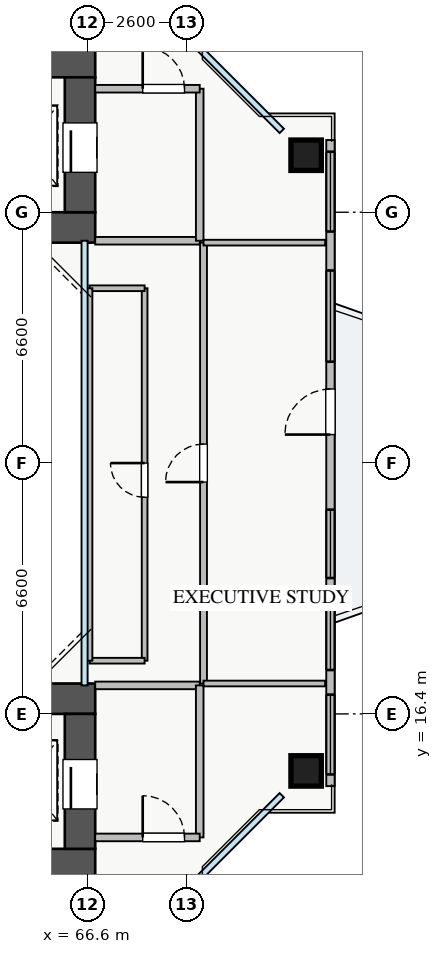
"""IFC4 building model, lengths in metres.
Left out: names, types, materials, properties, quantities, classifications, styles, units other than length and angle.
Written with IfcOpenShell. Run it as: python <this file> out.ifc"""

import sys

from ifc_helpers import new_model, si_unit, direction, frame, frame_2d, origin, origin_2d, place, context, subcontext, project, spatial, rectangle, extrude, source, transform, mapped, element, fill, save


model = new_model("IFC4")
c1 = context("Model", 3, precision=1e-05, world=origin(), true_north=direction((0.0, 1.0)))
c2 = subcontext(c1, "Body", "Model", "MODEL_VIEW")
j1 = project(units=[si_unit("LENGTHUNIT", "METRE"), si_unit("PLANEANGLEUNIT", "RADIAN")], contexts=[c1])
p1 = place(None, origin())
s1 = spatial("IfcSite", under=j1, at=p1, CompositionType="ELEMENT")
p2 = place(p1, origin())
s2 = spatial("IfcBuilding", under=s1, at=p2, CompositionType="ELEMENT")
p3 = place(p2, frame((0.0, 0.0, 100.25)))
s3 = spatial("IfcBuildingStorey", under=s2, at=p3, CompositionType="ELEMENT", Elevation=100.25)
p4 = place(p3, frame((54.2, 29.2, 0.0), z_axis=(0.0, 0.0, 1.0), x_axis=(1.0, 0.0, 0.0)))
e1 = element("IfcWall", 1, at=p4, inside=s3, PredefinedType="SHEAR", context=c2, shape_type="SweptSolid", body=[
    extrude(rectangle(XDim=12.6, YDim=0.8, at=frame_2d((6.3, 0.0))), origin(), (0.0, 0.0, 1.0), 3.25),
])
p5 = place(p3, frame((54.2, 33.55, 0.0), z_axis=(0.0, 0.0, 1.0), x_axis=(1.0, 0.0, 0.0)))
e2 = element("IfcWall", 2, at=p5, inside=s3, PredefinedType="SHEAR", context=c2, shape_type="SweptSolid", body=[
    extrude(rectangle(XDim=12.6, YDim=0.8, at=frame_2d((6.3, 0.0))), origin(), (0.0, 0.0, 1.0), 3.25),
])
p6 = place(p5, frame((8.2, 0.0, 0.0)))
e3 = element("IfcOpeningElement", 3, at=p6, cuts=e2, PredefinedType="OPENING", context=c2, shape_type="SweptSolid", body=[
    extrude(rectangle(XDim=1.1, YDim=2.05, at=frame_2d((0.55, 1.025))), frame((0.0, 0.41, 0.0), z_axis=(0.0, -1.0, 0.0), x_axis=(1.0, 0.0, 0.0)), (0.0, 0.0, 1.0), 0.82),
])
p7 = place(p3, frame((66.4, 29.6, 0.0), z_axis=(0.0, 0.0, 1.0), x_axis=(0.0, 1.0, 0.0)))
e4 = element("IfcWall", 4, at=p7, inside=s3, PredefinedType="SHEAR", context=c2, shape_type="SweptSolid", body=[
    extrude(rectangle(XDim=3.55, YDim=0.8, at=frame_2d((1.775, 0.0))), origin(), (0.0, 0.0, 1.0), 3.25),
])
p8 = place(p7, frame((1.05, 0.0, 0.0)))
e5 = element("IfcOpeningElement", 5, at=p8, cuts=e4, PredefinedType="OPENING", context=c2, shape_type="SweptSolid", body=[
    extrude(rectangle(XDim=1.3, YDim=2.05, at=frame_2d((0.65, 1.025))), frame((0.0, 0.41, 0.0), z_axis=(0.0, -1.0, 0.0), x_axis=(1.0, 0.0, 0.0)), (0.0, 0.0, 1.0), 0.82),
])
p9 = place(p3, frame((54.2, 12.45, 0.0), z_axis=(0.0, 0.0, 1.0), x_axis=(1.0, 0.0, 0.0)))
e6 = element("IfcWall", 6, at=p9, inside=s3, PredefinedType="SHEAR", context=c2, shape_type="SweptSolid", body=[
    extrude(rectangle(XDim=12.6, YDim=0.8, at=frame_2d((6.3, 0.0))), origin(), (0.0, 0.0, 1.0), 3.25),
])
p10 = place(p9, frame((8.2, 0.0, 0.0)))
e7 = element("IfcOpeningElement", 7, at=p10, cuts=e6, PredefinedType="OPENING", context=c2, shape_type="SweptSolid", body=[
    extrude(rectangle(XDim=1.1, YDim=2.05, at=frame_2d((0.55, 1.025))), frame((0.0, 0.41, 0.0), z_axis=(0.0, -1.0, 0.0), x_axis=(1.0, 0.0, 0.0)), (0.0, 0.0, 1.0), 0.82),
])
p11 = place(p3, frame((54.2, 16.8, 0.0), z_axis=(0.0, 0.0, 1.0), x_axis=(1.0, 0.0, 0.0)))
e8 = element("IfcWall", 8, at=p11, inside=s3, PredefinedType="SHEAR", context=c2, shape_type="SweptSolid", body=[
    extrude(rectangle(XDim=12.6, YDim=0.8, at=frame_2d((6.3, 0.0))), origin(), (0.0, 0.0, 1.0), 3.25),
])
p12 = place(p3, frame((66.4, 12.85, 0.0), z_axis=(0.0, 0.0, 1.0), x_axis=(0.0, 1.0, 0.0)))
e9 = element("IfcWall", 9, at=p12, inside=s3, PredefinedType="SHEAR", context=c2, shape_type="SweptSolid", body=[
    extrude(rectangle(XDim=3.55, YDim=0.8, at=frame_2d((1.775, 0.0))), origin(), (0.0, 0.0, 1.0), 3.25),
])
p13 = place(p12, frame((1.05, 0.0, 0.0)))
e10 = element("IfcOpeningElement", 10, at=p13, cuts=e9, PredefinedType="OPENING", context=c2, shape_type="SweptSolid", body=[
    extrude(rectangle(XDim=1.3, YDim=2.05, at=frame_2d((0.65, 1.025))), frame((0.0, 0.41, 0.0), z_axis=(0.0, -1.0, 0.0), x_axis=(1.0, 0.0, 0.0)), (0.0, 0.0, 1.0), 0.82),
])
m1 = source(origin(), c2, "Body", "SweptSolid", [
    extrude(rectangle(XDim=0.8, YDim=0.8, at=origin_2d()), origin(), (0.0, 0.0, 1.0), 3.25),
])
for number, where, z_axis, x_axis in (
    (11, (72.35, 14.9, 0.0), (0.0, 0.0, 1.0), (1.0, 0.0, 0.0)),
    (12, (72.35, 31.1, 0.0), (0.0, 0.0, 1.0), (1.0, 0.0, 0.0)),
):
    element("IfcColumn", number, at=place(p3, frame(where, z_axis=z_axis, x_axis=x_axis)), inside=s3, PredefinedType="COLUMN", context=c2, shape_type="MappedRepresentation", body=[
        mapped(m1, transform((0.0, 0.0, 0.0), x_axis=(1.0, 0.0, 0.0), y_axis=(0.0, 1.0, 0.0), z_axis=(0.0, 0.0, 1.0), scale=1.0)),
    ])
p14 = place(p3, frame((72.99, 14.5, 0.0), z_axis=(0.0, 0.0, 1.0), x_axis=(0.0, 1.0, 0.0)))
e13 = element("IfcWall", 13, at=p14, inside=s3, PredefinedType="STANDARD", context=c2, shape_type="SweptSolid", body=[
    extrude(rectangle(XDim=17.0, YDim=0.22, at=frame_2d((8.5, 0.0))), origin(), (0.0, 0.0, 1.0), 2.61),
])
p15 = place(p14, frame((9.25, 0.0, 0.0)))
e14 = element("IfcOpeningElement", 14, at=p15, cuts=e13, PredefinedType="OPENING", context=c2, shape_type="SweptSolid", body=[
    extrude(rectangle(XDim=1.2, YDim=2.1, at=frame_2d((0.6, 1.05))), frame((0.0, 0.12, 0.0), z_axis=(0.0, -1.0, 0.0), x_axis=(1.0, 0.0, 0.0)), (0.0, 0.0, 1.0), 0.24),
])
p16 = place(p14, frame((0.308, 0.0, 0.9)))
e15 = element("IfcOpeningElement", 15, at=p16, cuts=e13, PredefinedType="OPENING", context=c2, shape_type="SweptSolid", body=[
    extrude(rectangle(XDim=2.1, YDim=1.5, at=frame_2d((1.05, 0.75))), frame((0.0, 0.12, 0.0), z_axis=(0.0, -1.0, 0.0), x_axis=(1.0, 0.0, 0.0)), (0.0, 0.0, 1.0), 0.24),
])
p17 = place(p14, frame((5.475, 0.0, 0.9)))
e16 = element("IfcOpeningElement", 16, at=p17, cuts=e13, PredefinedType="OPENING", context=c2, shape_type="SweptSolid", body=[
    extrude(rectangle(XDim=1.8, YDim=1.45, at=frame_2d((0.9, 0.725))), frame((0.0, 0.12, 0.0), z_axis=(0.0, -1.0, 0.0), x_axis=(1.0, 0.0, 0.0)), (0.0, 0.0, 1.0), 0.24),
])
p18 = place(p14, frame((14.593, 0.0, 0.9)))
e17 = element("IfcOpeningElement", 17, at=p18, cuts=e13, PredefinedType="OPENING", context=c2, shape_type="SweptSolid", body=[
    extrude(rectangle(XDim=2.1, YDim=1.5, at=frame_2d((1.05, 0.75))), frame((0.0, 0.12, 0.0), z_axis=(0.0, -1.0, 0.0), x_axis=(1.0, 0.0, 0.0)), (0.0, 0.0, 1.0), 0.24),
])
p19 = place(p14, frame((3.055, 0.0, 0.9)))
e18 = element("IfcOpeningElement", 18, at=p19, cuts=e13, PredefinedType="OPENING", context=c2, shape_type="SweptSolid", body=[
    extrude(rectangle(XDim=2.1, YDim=1.5, at=frame_2d((1.05, 0.75))), frame((0.0, 0.12, 0.0), z_axis=(0.0, -1.0, 0.0), x_axis=(1.0, 0.0, 0.0)), (0.0, 0.0, 1.0), 0.24),
])
p20 = place(p14, frame((11.167, 0.0, 0.9)))
e19 = element("IfcOpeningElement", 19, at=p20, cuts=e13, PredefinedType="OPENING", context=c2, shape_type="SweptSolid", body=[
    extrude(rectangle(XDim=2.4, YDim=1.5, at=frame_2d((1.2, 0.75))), frame((0.0, 0.12, 0.0), z_axis=(0.0, -1.0, 0.0), x_axis=(1.0, 0.0, 0.0)), (0.0, 0.0, 1.0), 0.24),
])
p21 = place(p3, frame((66.8, 28.85, 0.0), z_axis=(0.0, 0.0, 1.0), x_axis=(1.0, 0.0, 0.0)))
e20 = element("IfcWall", 20, at=p21, inside=s3, PredefinedType="PARTITIONING", context=c2, shape_type="SweptSolid", body=[
    extrude(rectangle(XDim=2.75, YDim=0.2, at=frame_2d((1.375, 0.0))), origin(), (0.0, 0.0, 1.0), 3.07),
])
p22 = place(p3, frame((69.55, 28.85, 0.0), z_axis=(0.0, 0.0, 1.0), x_axis=(0.0, 1.0, 0.0)))
e21 = element("IfcWall", 21, at=p22, inside=s3, PredefinedType="PARTITIONING", context=c2, shape_type="SweptSolid", body=[
    extrude(rectangle(XDim=4.0, YDim=0.2, at=frame_2d((2.0, 0.0))), origin(), (0.0, 0.0, 1.0), 3.07),
])
p23 = place(p3, frame((66.8, 32.85, 0.0), z_axis=(0.0, 0.0, 1.0), x_axis=(1.0, 0.0, 0.0)))
e22 = element("IfcWall", 22, at=p23, inside=s3, PredefinedType="PARTITIONING", context=c2, shape_type="SweptSolid", body=[
    extrude(rectangle(XDim=2.75, YDim=0.2, at=frame_2d((1.375, 0.0))), origin(), (0.0, 0.0, 1.0), 3.07),
])
p24 = place(p23, frame((1.25, 0.0, 0.0)))
e23 = element("IfcOpeningElement", 23, at=p24, cuts=e22, PredefinedType="OPENING", context=c2, shape_type="SweptSolid", body=[
    extrude(rectangle(XDim=1.1, YDim=2.05, at=frame_2d((0.55, 1.025))), frame((0.0, 0.11, 0.0), z_axis=(0.0, -1.0, 0.0), x_axis=(1.0, 0.0, 0.0)), (0.0, 0.0, 1.0), 0.22),
])
p25 = place(p3, frame((66.8, 17.15, 0.0), z_axis=(0.0, 0.0, 1.0), x_axis=(1.0, 0.0, 0.0)))
e24 = element("IfcWall", 24, at=p25, inside=s3, PredefinedType="PARTITIONING", context=c2, shape_type="SweptSolid", body=[
    extrude(rectangle(XDim=2.75, YDim=0.2, at=frame_2d((1.375, 0.0))), origin(), (0.0, 0.0, 1.0), 3.07),
])
p26 = place(p3, frame((69.55, 13.15, 0.0), z_axis=(0.0, 0.0, 1.0), x_axis=(0.0, 1.0, 0.0)))
e25 = element("IfcWall", 25, at=p26, inside=s3, PredefinedType="PARTITIONING", context=c2, shape_type="SweptSolid", body=[
    extrude(rectangle(XDim=4.0, YDim=0.2, at=frame_2d((2.0, 0.0))), origin(), (0.0, 0.0, 1.0), 3.07),
])
p27 = place(p3, frame((66.8, 13.15, 0.0), z_axis=(0.0, 0.0, 1.0), x_axis=(1.0, 0.0, 0.0)))
e26 = element("IfcWall", 26, at=p27, inside=s3, PredefinedType="PARTITIONING", context=c2, shape_type="SweptSolid", body=[
    extrude(rectangle(XDim=2.75, YDim=0.2, at=frame_2d((1.375, 0.0))), origin(), (0.0, 0.0, 1.0), 3.07),
])
p28 = place(p27, frame((1.25, 0.0, 0.0)))
e27 = element("IfcOpeningElement", 27, at=p28, cuts=e26, PredefinedType="OPENING", context=c2, shape_type="SweptSolid", body=[
    extrude(rectangle(XDim=1.1, YDim=2.05, at=frame_2d((0.55, 1.025))), frame((0.0, 0.11, 0.0), z_axis=(0.0, -1.0, 0.0), x_axis=(1.0, 0.0, 0.0)), (0.0, 0.0, 1.0), 0.22),
])
p29 = place(p3, frame((69.65, 17.2, 0.0), z_axis=(0.0, 0.0, 1.0), x_axis=(0.0, 1.0, 0.0)))
e28 = element("IfcWall", 28, at=p29, inside=s3, PredefinedType="PARTITIONING", context=c2, shape_type="SweptSolid", body=[
    extrude(rectangle(XDim=11.6, YDim=0.18, at=frame_2d((5.8, 0.0))), origin(), (0.0, 0.0, 1.0), 3.07),
])
p30 = place(p29, frame((5.3, 0.0, 0.0)))
e29 = element("IfcOpeningElement", 29, at=p30, cuts=e28, PredefinedType="OPENING", context=c2, shape_type="SweptSolid", body=[
    extrude(rectangle(XDim=1.0, YDim=2.05, at=frame_2d((0.5, 1.025))), frame((0.0, 0.1, 0.0), z_axis=(0.0, -1.0, 0.0), x_axis=(1.0, 0.0, 0.0)), (0.0, 0.0, 1.0), 0.2),
])
for number, where, z_axis, x_axis in (
    (30, (69.65, 17.2, 0.0), (0.0, 0.0, 1.0), (1.0, 0.0, 0.0)),
    (31, (69.65, 28.8, 0.0), (0.0, 0.0, 1.0), (1.0, 0.0, 0.0)),
):
    element("IfcWall", number, at=place(p3, frame(where, z_axis=z_axis, x_axis=x_axis)), inside=s3, PredefinedType="PARTITIONING", context=c2, shape_type="SweptSolid", body=[
        extrude(rectangle(XDim=3.2, YDim=0.15, at=frame_2d((1.6, 0.0))), origin(), (0.0, 0.0, 1.0), 3.07),
    ])
p31 = place(p3, frame((68.1, 17.8, 0.0), z_axis=(0.0, 0.0, 1.0), x_axis=(0.0, 1.0, 0.0)))
e32 = element("IfcWall", 32, at=p31, inside=s3, PredefinedType="PARTITIONING", context=c2, shape_type="SweptSolid", body=[
    extrude(rectangle(XDim=9.8, YDim=0.15, at=frame_2d((4.9, 0.0))), origin(), (0.0, 0.0, 1.0), 3.07),
])
p32 = place(p31, frame((4.3, 0.0, 0.0)))
e33 = element("IfcOpeningElement", 33, at=p32, cuts=e32, PredefinedType="OPENING", context=c2, shape_type="SweptSolid", body=[
    extrude(rectangle(XDim=0.9, YDim=2.05, at=frame_2d((0.45, 1.025))), frame((0.0, 0.085, 0.0), z_axis=(0.0, -1.0, 0.0), x_axis=(1.0, 0.0, 0.0)), (0.0, 0.0, 1.0), 0.17),
])
p33 = place(p3, frame((66.65, 27.6, 0.0), z_axis=(0.0, 0.0, 1.0), x_axis=(1.0, 0.0, 0.0)))
e34 = element("IfcWall", 34, at=p33, inside=s3, PredefinedType="PARTITIONING", context=c2, shape_type="SweptSolid", body=[
    extrude(rectangle(XDim=1.45, YDim=0.15, at=frame_2d((0.725, 0.0))), origin(), (0.0, 0.0, 1.0), 2.765),
])
p34 = place(p3, frame((66.65, 17.8, 0.0), z_axis=(0.0, 0.0, 1.0), x_axis=(1.0, 0.0, 0.0)))
e35 = element("IfcWall", 35, at=p34, inside=s3, PredefinedType="PARTITIONING", context=c2, shape_type="SweptSolid", body=[
    extrude(rectangle(XDim=1.45, YDim=0.15, at=frame_2d((0.725, 0.0))), origin(), (0.0, 0.0, 1.0), 3.07),
])
p35 = place(p3, frame((66.65, 17.8, 0.0), z_axis=(0.0, 0.0, 1.0), x_axis=(0.0, 1.0, 0.0)))
e36 = element("IfcWall", 36, at=p35, inside=s3, PredefinedType="PARTITIONING", context=c2, shape_type="SweptSolid", body=[
    extrude(rectangle(XDim=9.8, YDim=0.15, at=frame_2d((4.9, 0.0))), origin(), (0.0, 0.0, 1.0), 2.665),
])
m2 = source(origin(), c2, "Body", "SweptSolid", [
    extrude(rectangle(XDim=1.2, YDim=2.1, at=frame_2d((0.6, 1.05))), frame((0.0, 0.025, 0.0), z_axis=(0.0, -1.0, 0.0), x_axis=(1.0, 0.0, 0.0)), (0.0, 0.0, 1.0), 0.05),
])
p36 = place(p15, origin())
e37 = element("IfcDoor", 37, at=p36, inside=s3, OperationType="SINGLE_SWING_LEFT", PredefinedType="DOOR", context=c2, shape_type="MappedRepresentation", body=[
    mapped(m2, transform((0.0, 0.0, 0.0), x_axis=(1.0, 0.0, 0.0), y_axis=(0.0, 1.0, 0.0), z_axis=(0.0, 0.0, 1.0), scale=1.0)),
])
fill(e14, e37)
m3 = source(origin(), c2, "Body", "SweptSolid", [
    extrude(rectangle(XDim=2.1, YDim=1.5, at=frame_2d((1.05, 0.75))), frame((0.0, 0.03, 0.0), z_axis=(0.0, -1.0, 0.0), x_axis=(1.0, 0.0, 0.0)), (0.0, 0.0, 1.0), 0.06),
])
p37 = place(p16, origin())
e38 = element("IfcWindow", 38, at=p37, inside=s3, PartitioningType="TRIPLE_PANEL_VERTICAL", PredefinedType="WINDOW", context=c2, shape_type="MappedRepresentation", body=[
    mapped(m3, transform((0.0, 0.0, 0.0), x_axis=(1.0, 0.0, 0.0), y_axis=(0.0, 1.0, 0.0), z_axis=(0.0, 0.0, 1.0), scale=1.0)),
])
fill(e15, e38)
m4 = source(origin(), c2, "Body", "SweptSolid", [
    extrude(rectangle(XDim=1.8, YDim=1.45, at=frame_2d((0.9, 0.725))), frame((0.0, 0.03, 0.0), z_axis=(0.0, -1.0, 0.0), x_axis=(1.0, 0.0, 0.0)), (0.0, 0.0, 1.0), 0.06),
])
p38 = place(p17, origin())
e39 = element("IfcWindow", 39, at=p38, inside=s3, PartitioningType="DOUBLE_PANEL_VERTICAL", PredefinedType="WINDOW", context=c2, shape_type="MappedRepresentation", body=[
    mapped(m4, transform((0.0, 0.0, 0.0), x_axis=(1.0, 0.0, 0.0), y_axis=(0.0, 1.0, 0.0), z_axis=(0.0, 0.0, 1.0), scale=1.0)),
])
fill(e16, e39)
p39 = place(p18, origin())
e40 = element("IfcWindow", 40, at=p39, inside=s3, PartitioningType="TRIPLE_PANEL_VERTICAL", PredefinedType="WINDOW", context=c2, shape_type="MappedRepresentation", body=[
    mapped(m3, transform((0.0, 0.0, 0.0), x_axis=(1.0, 0.0, 0.0), y_axis=(0.0, 1.0, 0.0), z_axis=(0.0, 0.0, 1.0), scale=1.0)),
])
fill(e17, e40)
m5 = source(origin(), c2, "Body", "SweptSolid", [
    extrude(rectangle(XDim=1.3, YDim=2.05, at=frame_2d((0.65, 1.025))), frame((0.0, 0.025, 0.0), z_axis=(0.0, -1.0, 0.0), x_axis=(1.0, 0.0, 0.0)), (0.0, 0.0, 1.0), 0.05),
])
p40 = place(p8, origin())
e41 = element("IfcDoor", 41, at=p40, inside=s3, OperationType="SLIDING_TO_LEFT", PredefinedType="DOOR", context=c2, shape_type="MappedRepresentation", body=[
    mapped(m5, transform((0.0, 0.0, 0.0), x_axis=(1.0, 0.0, 0.0), y_axis=(0.0, 1.0, 0.0), z_axis=(0.0, 0.0, 1.0), scale=1.0)),
])
fill(e5, e41)
p41 = place(p13, origin())
e42 = element("IfcDoor", 42, at=p41, inside=s3, OperationType="SLIDING_TO_RIGHT", PredefinedType="DOOR", context=c2, shape_type="MappedRepresentation", body=[
    mapped(m5, transform((0.0, 0.0, 0.0), x_axis=(1.0, 0.0, 0.0), y_axis=(0.0, 1.0, 0.0), z_axis=(0.0, 0.0, 1.0), scale=1.0)),
])
fill(e10, e42)
m6 = source(origin(), c2, "Body", "SweptSolid", [
    extrude(rectangle(XDim=1.1, YDim=2.05, at=frame_2d((0.55, 1.025))), frame((0.0, 0.025, 0.0), z_axis=(0.0, -1.0, 0.0), x_axis=(1.0, 0.0, 0.0)), (0.0, 0.0, 1.0), 0.05),
])
p42 = place(p24, origin())
e43 = element("IfcDoor", 43, at=p42, inside=s3, OperationType="SINGLE_SWING_LEFT", PredefinedType="DOOR", context=c2, shape_type="MappedRepresentation", body=[
    mapped(m6, transform((0.0, 0.0, 0.0), x_axis=(1.0, 0.0, 0.0), y_axis=(0.0, 1.0, 0.0), z_axis=(0.0, 0.0, 1.0), scale=1.0)),
])
fill(e23, e43)
p43 = place(p28, origin())
e44 = element("IfcDoor", 44, at=p43, inside=s3, OperationType="SINGLE_SWING_LEFT", PredefinedType="DOOR", context=c2, shape_type="MappedRepresentation", body=[
    mapped(m6, transform((0.0, 0.0, 0.0), x_axis=(1.0, 0.0, 0.0), y_axis=(0.0, 1.0, 0.0), z_axis=(0.0, 0.0, 1.0), scale=1.0)),
])
fill(e27, e44)
m7 = source(origin(), c2, "Body", "SweptSolid", [
    extrude(rectangle(XDim=1.0, YDim=2.05, at=frame_2d((0.5, 1.025))), frame((0.0, 0.025, 0.0), z_axis=(0.0, -1.0, 0.0), x_axis=(1.0, 0.0, 0.0)), (0.0, 0.0, 1.0), 0.05),
])
p44 = place(p30, origin())
e45 = element("IfcDoor", 45, at=p44, inside=s3, OperationType="SINGLE_SWING_LEFT", PredefinedType="DOOR", context=c2, shape_type="MappedRepresentation", body=[
    mapped(m7, transform((0.0, 0.0, 0.0), x_axis=(1.0, 0.0, 0.0), y_axis=(0.0, 1.0, 0.0), z_axis=(0.0, 0.0, 1.0), scale=1.0)),
])
fill(e29, e45)
m8 = source(origin(), c2, "Body", "SweptSolid", [
    extrude(rectangle(XDim=0.9, YDim=2.05, at=frame_2d((0.45, 1.025))), frame((0.0, 0.025, 0.0), z_axis=(0.0, -1.0, 0.0), x_axis=(1.0, 0.0, 0.0)), (0.0, 0.0, 1.0), 0.05),
])
p45 = place(p32, origin())
e46 = element("IfcDoor", 46, at=p45, inside=s3, OperationType="SINGLE_SWING_RIGHT", PredefinedType="DOOR", context=c2, shape_type="MappedRepresentation", body=[
    mapped(m8, transform((0.0, 0.0, 0.0), x_axis=(1.0, 0.0, 0.0), y_axis=(0.0, 1.0, 0.0), z_axis=(0.0, 0.0, 1.0), scale=1.0)),
])
fill(e33, e46)
p46 = place(p19, origin())
e47 = element("IfcWindow", 47, at=p46, inside=s3, PartitioningType="TRIPLE_PANEL_VERTICAL", PredefinedType="WINDOW", context=c2, shape_type="MappedRepresentation", body=[
    mapped(m3, transform((0.0, 0.0, 0.0), x_axis=(1.0, 0.0, 0.0), y_axis=(0.0, 1.0, 0.0), z_axis=(0.0, 0.0, 1.0), scale=1.0)),
])
fill(e18, e47)
m9 = source(origin(), c2, "Body", "SweptSolid", [
    extrude(rectangle(XDim=2.4, YDim=1.5, at=frame_2d((1.2, 0.75))), frame((0.0, 0.03, 0.0), z_axis=(0.0, -1.0, 0.0), x_axis=(1.0, 0.0, 0.0)), (0.0, 0.0, 1.0), 0.06),
])
p47 = place(p20, origin())
e48 = element("IfcWindow", 48, at=p47, inside=s3, PartitioningType="TRIPLE_PANEL_VERTICAL", PredefinedType="WINDOW", context=c2, shape_type="MappedRepresentation", body=[
    mapped(m9, transform((0.0, 0.0, 0.0), x_axis=(1.0, 0.0, 0.0), y_axis=(0.0, 1.0, 0.0), z_axis=(0.0, 0.0, 1.0), scale=1.0)),
])
fill(e19, e48)
save(model, sys.argv[1])
